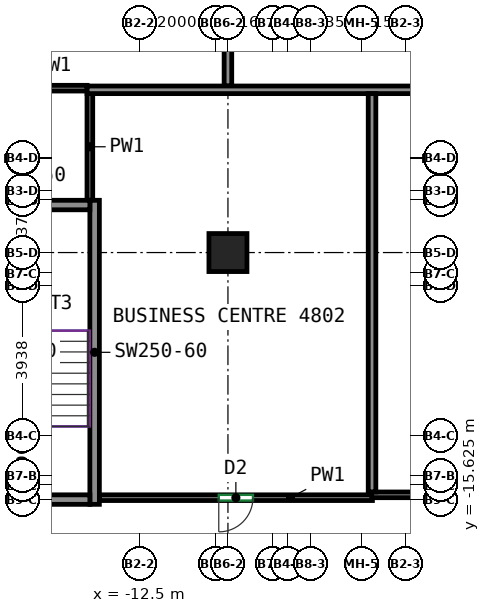
"""IFC4 building model, lengths in metres.
Left out: names, types, materials, properties, quantities, classifications, styles, units other than length and angle.
Written with IfcOpenShell. Run it as: python <this file> out.ifc"""

import sys

from ifc_helpers import new_model, si_unit, direction, frame, frame_2d, origin, origin_2d, place, context, subcontext, project, spatial, rectangle, extrude, source, transform, mapped, element, fill, save


model = new_model("IFC4")
c1 = context("Model", 3, precision=1e-05, world=origin(), true_north=direction((0.0, 1.0)))
c2 = subcontext(c1, "Body", "Model", "MODEL_VIEW")
j1 = project(units=[si_unit("LENGTHUNIT", "METRE"), si_unit("PLANEANGLEUNIT", "RADIAN")], contexts=[c1])
p1 = place(None, origin())
s1 = spatial("IfcSite", under=j1, at=p1, CompositionType="ELEMENT")
p2 = place(p1, origin())
s2 = spatial("IfcBuilding", under=s1, at=p2, CompositionType="ELEMENT")
p3 = place(p2, frame((0.0, 0.0, 199.9)))
s3 = spatial("IfcBuildingStorey", under=s2, at=p3, CompositionType="ELEMENT", Elevation=199.9)
m1 = source(origin(), c2, "Body", "SweptSolid", [
    extrude(rectangle(XDim=1.0, YDim=1.0, at=origin_2d()), origin(), (0.0, 0.0, 1.0), 3.12),
])
p4 = place(p3, frame((-10.167, -9.125, 0.0), z_axis=(0.0, 0.0, 1.0), x_axis=(1.0, 0.0, 0.0)))
e1 = element("IfcColumn", 1, at=p4, inside=s3, PredefinedType="COLUMN", context=c2, shape_type="MappedRepresentation", body=[
    mapped(m1, transform((0.0, 0.0, 0.0))),
])
m2 = source(origin(), c2, "Body", "SweptSolid", [
    extrude(rectangle(XDim=8.0, YDim=0.25, at=frame_2d((4.0, 0.0))), origin(), (0.0, 0.0, 1.0), 3.12),
])
p5 = place(p3, frame((-13.675, -15.75, 0.0), z_axis=(0.0, 0.0, 1.0), x_axis=(0.0, 1.0, 0.0)))
e2 = element("IfcWall", 2, at=p5, inside=s3, PredefinedType="SHEAR", context=c2, shape_type="MappedRepresentation", body=[
    mapped(m2, transform((0.0, 0.0, 0.0))),
])
m3 = source(origin(), c2, "Body", "SweptSolid", [
    extrude(rectangle(XDim=3.7, YDim=0.25, at=frame_2d((1.85, 0.0))), origin(), (0.0, 0.0, 1.0), 3.12),
])
p6 = place(p3, frame((-17.5, -15.625, 0.0), z_axis=(0.0, 0.0, 1.0), x_axis=(1.0, 0.0, 0.0)))
e3 = element("IfcWall", 3, at=p6, inside=s3, PredefinedType="SHEAR", context=c2, shape_type="MappedRepresentation", body=[
    mapped(m3, transform((0.0, 0.0, 0.0))),
])
p7 = place(p6, frame((1.25, 0.0, 0.0)))
e4 = element("IfcOpeningElement", 4, at=p7, cuts=e3, PredefinedType="OPENING", context=c2, shape_type="SweptSolid", body=[
    extrude(rectangle(XDim=1.2, YDim=2.1, at=frame_2d((0.6, 1.05))), frame((0.0, 0.135, 0.0), z_axis=(0.0, -1.0, 0.0), x_axis=(1.0, 0.0, 0.0)), (0.0, 0.0, 1.0), 0.27),
])
p8 = place(p3, frame((-17.5, -7.875, 0.0), z_axis=(0.0, 0.0, 1.0), x_axis=(1.0, 0.0, 0.0)))
e5 = element("IfcWall", 5, at=p8, inside=s3, PredefinedType="SHEAR", context=c2, shape_type="MappedRepresentation", body=[
    mapped(m3, transform((0.0, 0.0, 0.0))),
])
p9 = place(p3, frame((-17.575, -4.8, 0.0), z_axis=(0.0, 0.0, 1.0), x_axis=(1.0, 0.0, 0.0)))
e6 = element("IfcWall", 6, at=p9, inside=s3, PredefinedType="PARTITIONING", context=c2, shape_type="SweptSolid", body=[
    extrude(rectangle(XDim=3.702, YDim=0.15, at=frame_2d((1.851, 0.0))), origin(), (0.0, 0.0, 1.0), 3.12),
])
p10 = place(p3, frame((-13.8, -7.75, 0.0), z_axis=(0.0, 0.0, 1.0), x_axis=(0.0, 1.0, 0.0)))
e7 = element("IfcWall", 7, at=p10, inside=s3, PredefinedType="PARTITIONING", context=c2, shape_type="SweptSolid", body=[
    extrude(rectangle(XDim=2.817, YDim=0.15, at=frame_2d((1.408, 0.0))), origin(), (0.0, 0.0, 1.0), 3.12),
])
p11 = place(p3, frame((-6.365, -15.575, 0.0), z_axis=(0.0, 0.0, 1.0), x_axis=(-1.0, 0.0, 0.0)))
e8 = element("IfcWall", 8, at=p11, inside=s3, PredefinedType="PARTITIONING", context=c2, shape_type="SweptSolid", body=[
    extrude(rectangle(XDim=7.185, YDim=0.15, at=frame_2d((3.593, 0.0))), origin(), (0.0, 0.0, 1.0), 3.12),
])
p12 = place(p11, frame((3.143, 0.0, 0.0)))
e9 = element("IfcOpeningElement", 9, at=p12, cuts=e8, PredefinedType="OPENING", context=c2, shape_type="SweptSolid", body=[
    extrude(rectangle(XDim=0.9, YDim=2.1, at=frame_2d((0.45, 1.05))), frame((0.0, 0.085, 0.0), z_axis=(0.0, -1.0, 0.0), x_axis=(1.0, 0.0, 0.0)), (0.0, 0.0, 1.0), 0.17),
])
p13 = place(p3, frame((-6.385, -15.5, 0.0), z_axis=(0.0, 0.0, 1.0), x_axis=(1.0, 0.0, 0.0)))
e10 = element("IfcWall", 10, at=p13, inside=s3, PredefinedType="PARTITIONING", context=c2, shape_type="SweptSolid", body=[
    extrude(rectangle(XDim=22.66, YDim=0.15, at=frame_2d((11.33, 0.0))), origin(), (0.0, 0.0, 1.0), 3.12),
])
p14 = place(p13, frame((7.266, 0.0, 0.0)))
e11 = element("IfcOpeningElement", 11, at=p14, cuts=e10, PredefinedType="OPENING", context=c2, shape_type="SweptSolid", body=[
    extrude(rectangle(XDim=0.9, YDim=2.1, at=frame_2d((0.45, 1.05))), frame((0.0, 0.085, 0.0), z_axis=(0.0, -1.0, 0.0), x_axis=(1.0, 0.0, 0.0)), (0.0, 0.0, 1.0), 0.17),
])
p15 = place(p13, frame((14.576, 0.0, 0.0)))
e12 = element("IfcOpeningElement", 12, at=p15, cuts=e10, PredefinedType="OPENING", context=c2, shape_type="SweptSolid", body=[
    extrude(rectangle(XDim=0.9, YDim=2.1, at=frame_2d((0.45, 1.05))), frame((0.0, 0.085, 0.0), z_axis=(0.0, -1.0, 0.0), x_axis=(1.0, 0.0, 0.0)), (0.0, 0.0, 1.0), 0.17),
])
p16 = place(p3, frame((-10.167, -4.743, 0.0), z_axis=(0.0, 0.0, 1.0), x_axis=(0.0, 1.0, 0.0)))
e13 = element("IfcWall", 13, at=p16, inside=s3, PredefinedType="PARTITIONING", context=c2, shape_type="SweptSolid", body=[
    extrude(rectangle(XDim=3.681, YDim=0.2, at=frame_2d((1.84, 0.0))), origin(), (0.0, 0.0, 1.0), 2.52),
])
p17 = place(p3, frame((-13.873, -4.843, 0.0), z_axis=(0.0, 0.0, 1.0), x_axis=(1.0, 0.0, 0.0)))
e14 = element("IfcWall", 14, at=p17, inside=s3, PredefinedType="PARTITIONING", context=c2, shape_type="SweptSolid", body=[
    extrude(rectangle(XDim=30.146, YDim=0.2, at=frame_2d((15.073, 0.0))), origin(), (0.0, 0.0, 1.0), 3.12),
])
p18 = place(p3, frame((-6.375, -15.423, 0.0), z_axis=(0.0, 0.0, 1.0), x_axis=(0.0, 1.0, 0.0)))
e15 = element("IfcWall", 15, at=p18, inside=s3, PredefinedType="PARTITIONING", context=c2, shape_type="SweptSolid", body=[
    extrude(rectangle(XDim=10.48, YDim=0.2, at=frame_2d((5.24, 0.0))), origin(), (0.0, 0.0, 1.0), 3.12),
])
p19 = place(p12, origin())
e16 = element("IfcDoor", 16, at=p19, inside=s3, OperationType="SINGLE_SWING_RIGHT", PredefinedType="DOOR", context=c2, shape_type="SweptSolid", body=[
    extrude(rectangle(XDim=0.9, YDim=2.1, at=frame_2d((0.45, 1.05))), frame((0.0, 0.025, 0.0), z_axis=(0.0, -1.0, 0.0), x_axis=(1.0, 0.0, 0.0)), (0.0, 0.0, 1.0), 0.05),
])
fill(e9, e16)
save(model, sys.argv[1])
